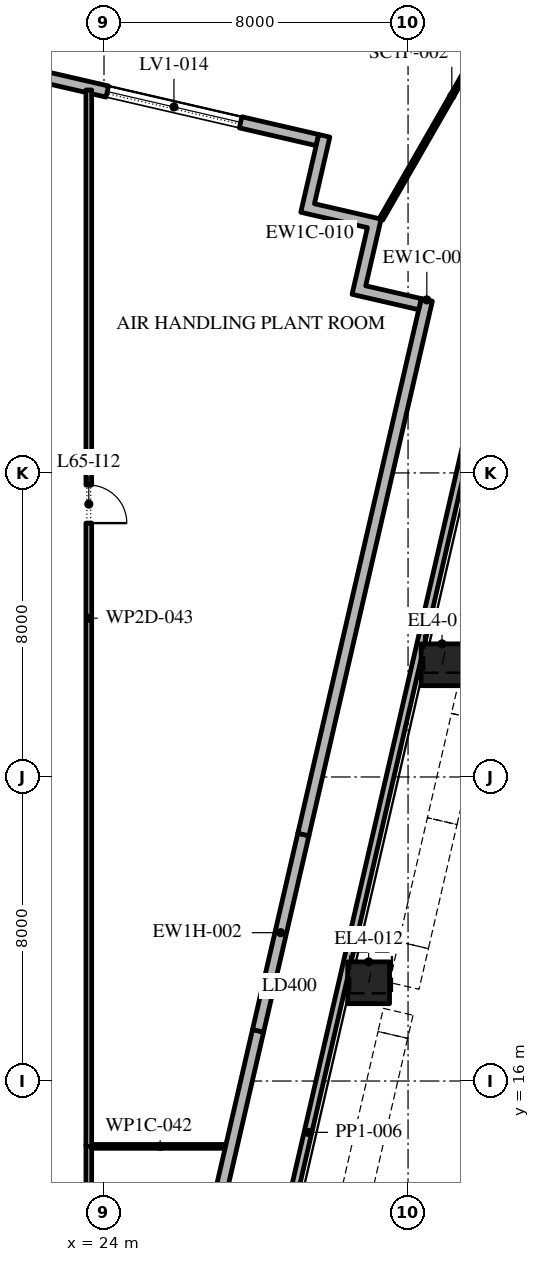
"""IFC4 building model, lengths in metres.
Left out: names, types, materials, properties, quantities, classifications, styles, units other than length and angle.
Written with IfcOpenShell. Run it as: python <this file> out.ifc"""

import sys

from ifc_helpers import new_model, si_unit, direction, frame, frame_2d, origin, origin_2d, place, context, subcontext, project, spatial, polyline, rectangle, outline, extrude, element, fill, save


model = new_model("IFC4")
c1 = context("Model", 3, precision=1e-05, world=origin(), true_north=direction((0.0, 1.0)))
c2 = subcontext(c1, "Body", "Model", "MODEL_VIEW")
j1 = project(units=[si_unit("LENGTHUNIT", "METRE"), si_unit("PLANEANGLEUNIT", "RADIAN")], contexts=[c1])
p1 = place(None, origin())
s1 = spatial("IfcSite", under=j1, at=p1, CompositionType="ELEMENT")
p2 = place(p1, origin())
s2 = spatial("IfcBuilding", under=s1, at=p2, CompositionType="ELEMENT")
p3 = place(p2, frame((0.0, 0.0, 297.6)))
s3 = spatial("IfcBuildingStorey", under=s2, at=p3, CompositionType="ELEMENT", Elevation=297.6)
p4 = place(p3, frame((30.963, 18.585, 0.0), z_axis=(0.01169416231, 0.050524199325, 0.998654370566), x_axis=(-0.974244251432, 0.225495318249, 0.0)))
e1 = element("IfcColumn", 1, at=p4, inside=s3, PredefinedType="COLUMN", context=c2, shape_type="SweptSolid", body=[
    extrude(rectangle(XDim=1.1, YDim=1.1, at=origin_2d()), origin(), (0.0, 0.0, 1.0), 5.407),
])
p5 = place(p3, frame((32.894, 26.952, 0.0), z_axis=(0.014617924938, 0.063118756136, 0.997898962267), x_axis=(-0.97421484969, 0.225622309721, 0.0)))
e2 = element("IfcColumn", 2, at=p5, inside=s3, PredefinedType="COLUMN", context=c2, shape_type="SweptSolid", body=[
    extrude(rectangle(XDim=1.1, YDim=1.1, at=origin_2d()), origin(), (0.0, 0.0, 1.0), 5.411),
])
p6 = place(p3, frame((29.616, 40.758, 0.0), z_axis=(0.0, 0.0, 1.0), x_axis=(-0.974370532314, 0.224949029246, 0.0)))
e3 = element("IfcWall", 3, at=p6, inside=s3, PredefinedType="STANDARD", context=c2, shape_type="SweptSolid", body=[
    extrude(rectangle(XDim=48.0, YDim=0.3, at=frame_2d((24.0, 0.0))), origin(), (0.0, 0.0, 1.0), 4.95),
])
p7 = place(p6, frame((2.075, 0.0, 0.6)))
e4 = element("IfcOpeningElement", 4, at=p7, cuts=e3, PredefinedType="OPENING", context=c2, shape_type="SweptSolid", body=[
    extrude(rectangle(XDim=3.6, YDim=3.9, at=frame_2d((1.8, 1.95))), frame((0.0, 0.16, 0.0), z_axis=(0.0, -1.0, 0.0), x_axis=(1.0, 0.0, 0.0)), (0.0, 0.0, 1.0), 0.32),
])
p8 = place(p6, frame((9.975, 0.0, 0.6)))
e5 = element("IfcOpeningElement", 5, at=p8, cuts=e3, PredefinedType="OPENING", context=c2, shape_type="SweptSolid", body=[
    extrude(rectangle(XDim=3.6, YDim=3.55, at=frame_2d((1.8, 1.775))), frame((0.0, 0.16, 0.0), z_axis=(0.0, -1.0, 0.0), x_axis=(1.0, 0.0, 0.0)), (0.0, 0.0, 1.0), 0.32),
])
p9 = place(p6, frame((18.025, 0.0, 0.6)))
e6 = element("IfcOpeningElement", 6, at=p9, cuts=e3, PredefinedType="OPENING", context=c2, shape_type="SweptSolid", body=[
    extrude(rectangle(XDim=3.6, YDim=3.55, at=frame_2d((1.8, 1.775))), frame((0.0, 0.16, 0.0), z_axis=(0.0, -1.0, 0.0), x_axis=(1.0, 0.0, 0.0)), (0.0, 0.0, 1.0), 0.32),
])
p10 = place(p6, frame((26.075, 0.0, 0.6)))
e7 = element("IfcOpeningElement", 7, at=p10, cuts=e3, PredefinedType="OPENING", context=c2, shape_type="SweptSolid", body=[
    extrude(rectangle(XDim=3.6, YDim=3.9, at=frame_2d((1.8, 1.95))), frame((0.0, 0.16, 0.0), z_axis=(0.0, -1.0, 0.0), x_axis=(1.0, 0.0, 0.0)), (0.0, 0.0, 1.0), 0.32),
])
p11 = place(p6, frame((34.125, 0.0, 0.6)))
e8 = element("IfcOpeningElement", 8, at=p11, cuts=e3, PredefinedType="OPENING", context=c2, shape_type="SweptSolid", body=[
    extrude(rectangle(XDim=3.6, YDim=3.55, at=frame_2d((1.8, 1.775))), frame((0.0, 0.16, 0.0), z_axis=(0.0, -1.0, 0.0), x_axis=(1.0, 0.0, 0.0)), (0.0, 0.0, 1.0), 0.32),
])
p12 = place(p6, frame((42.175, 0.0, 0.6)))
e9 = element("IfcOpeningElement", 9, at=p12, cuts=e3, PredefinedType="OPENING", context=c2, shape_type="SweptSolid", body=[
    extrude(rectangle(XDim=3.6, YDim=3.9, at=frame_2d((1.8, 1.95))), frame((0.0, 0.16, 0.0), z_axis=(0.0, -1.0, 0.0), x_axis=(1.0, 0.0, 0.0)), (0.0, 0.0, 1.0), 0.32),
])
p13 = place(p3, origin())
e10 = element("IfcWall", 10, at=p13, inside=s3, PredefinedType="STANDARD", context=c2, shape_type="SweptSolid", body=[
    extrude(outline(polyline([(30.931, 38.453), (29.177, 38.858), (29.65, 40.905), (29.942, 40.837), (29.537, 39.083), (31.291, 38.678), (30.886, 36.924), (32.348, 36.587), (32.28, 36.295), (30.526, 36.699), (30.931, 38.453)])), origin(), (0.0, 0.0, 1.0), 4.95),
])
p14 = place(p3, frame((22.757, -13.982, -0.05), z_axis=(0.0, 0.0, 1.0), x_axis=(0.224947491476, 0.974370887331, 0.0)))
e11 = element("IfcWall", 11, at=p14, inside=s3, PredefinedType="STANDARD", context=c2, shape_type="SweptSolid", body=[
    extrude(rectangle(XDim=58.769, YDim=0.2, at=frame_2d((29.385, 0.0))), origin(), (0.0, 0.0, 1.0), 1.1),
])
p15 = place(p3, frame((31.291, 38.678, -0.05), z_axis=(0.0, 0.0, 1.0), x_axis=(0.498200820302, 0.867061671769, 0.0)))
e12 = element("IfcWall", 12, at=p15, inside=s3, PredefinedType="STANDARD", context=c2, shape_type="SweptSolid", body=[
    extrude(rectangle(XDim=7.467, YDim=0.1, at=frame_2d((3.734, 0.0))), origin(), (0.0, 0.0, 1.0), 5.0),
])
p16 = place(p3, frame((23.6, 14.33, 0.0), z_axis=(0.0, 0.0, 1.0), x_axis=(0.0, -1.0, 0.0)))
e13 = element("IfcWall", 13, at=p16, inside=s3, PredefinedType="PARTITIONING", context=c2, shape_type="SweptSolid", body=[
    extrude(rectangle(XDim=12.255, YDim=0.15, at=frame_2d((6.127, 0.0))), origin(), (0.0, 0.0, 1.0), 4.95),
])
p17 = place(p16, frame((8.18, 0.0, 0.0)))
e14 = element("IfcOpeningElement", 14, at=p17, cuts=e13, PredefinedType="OPENING", context=c2, shape_type="SweptSolid", body=[
    extrude(rectangle(XDim=1.0, YDim=2.1, at=frame_2d((0.5, 1.05))), frame((0.0, 0.085, 0.0), z_axis=(0.0, -1.0, 0.0), x_axis=(1.0, 0.0, 0.0)), (0.0, 0.0, 1.0), 0.17),
])
p18 = place(p3, frame((23.675, 14.28, 0.0), z_axis=(0.0, 0.0, 1.0), x_axis=(1.0, 0.0, 0.0)))
e15 = element("IfcWall", 15, at=p18, inside=s3, PredefinedType="PARTITIONING", context=c2, shape_type="SweptSolid", body=[
    extrude(rectangle(XDim=3.605, YDim=0.1, at=frame_2d((1.802, 0.0))), origin(), (0.0, 0.0, 1.0), 4.95),
])
p19 = place(p3, frame((23.6, 42.076, 0.0), z_axis=(0.0, 0.0, 1.0), x_axis=(0.0, -1.0, 0.0)))
e16 = element("IfcWall", 16, at=p19, inside=s3, PredefinedType="PARTITIONING", context=c2, shape_type="SweptSolid", body=[
    extrude(rectangle(XDim=27.796, YDim=0.15, at=frame_2d((13.898, 0.0))), origin(), (0.0, 0.0, 1.0), 4.95),
])
p20 = place(p19, frame((10.396, 0.0, 0.0)))
e17 = element("IfcOpeningElement", 17, at=p20, cuts=e16, PredefinedType="OPENING", context=c2, shape_type="SweptSolid", body=[
    extrude(rectangle(XDim=1.0, YDim=2.1, at=frame_2d((0.5, 1.05))), frame((0.0, 0.085, 0.0), z_axis=(0.0, -1.0, 0.0), x_axis=(1.0, 0.0, 0.0)), (0.0, 0.0, 1.0), 0.17),
])
p21 = place(p3, frame((22.789, -5.485, 0.0), z_axis=(0.0, 0.0, 1.0), x_axis=(0.224937970591, 0.974373085315, 0.0)))
e18 = element("IfcWall", 18, at=p21, inside=s3, PredefinedType="STANDARD", context=c2, shape_type="SweptSolid", body=[
    extrude(rectangle(XDim=23.406, YDim=0.3, at=frame_2d((11.703, 0.0))), origin(), (0.0, 0.0, 1.0), 4.95),
])
p22 = place(p21, frame((2.215, 0.0, 0.6)))
e19 = element("IfcOpeningElement", 19, at=p22, cuts=e18, PredefinedType="OPENING", context=c2, shape_type="SweptSolid", body=[
    extrude(rectangle(XDim=3.6, YDim=3.8, at=frame_2d((1.8, 1.9))), frame((0.0, 0.16, 0.0), z_axis=(0.0, -1.0, 0.0), x_axis=(1.0, 0.0, 0.0)), (0.0, 0.0, 1.0), 0.32),
])
p23 = place(p21, frame((9.329, 0.0, 0.6)))
e20 = element("IfcOpeningElement", 20, at=p23, cuts=e18, PredefinedType="OPENING", context=c2, shape_type="SweptSolid", body=[
    extrude(rectangle(XDim=3.6, YDim=3.85, at=frame_2d((1.8, 1.925))), frame((0.0, 0.16, 0.0), z_axis=(0.0, -1.0, 0.0), x_axis=(1.0, 0.0, 0.0)), (0.0, 0.0, 1.0), 0.32),
])
p24 = place(p3, frame((28.054, 17.321, 0.0), z_axis=(0.0, 0.0, 1.0), x_axis=(0.224970521667, 0.974365570195, 0.0)))
e21 = element("IfcWall", 21, at=p24, inside=s3, PredefinedType="STANDARD", context=c2, shape_type="SweptSolid", body=[
    extrude(rectangle(XDim=5.3, YDim=0.3, at=frame_2d((2.65, 0.0))), origin(), (0.0, 0.0, 1.0), 4.05),
])
p25 = place(p3, frame((29.246, 22.486, 0.0), z_axis=(0.0, 0.0, 1.0), x_axis=(0.224953365503, 0.974369531209, 0.0)))
e22 = element("IfcWall", 22, at=p25, inside=s3, PredefinedType="STANDARD", context=c2, shape_type="SweptSolid", body=[
    extrude(rectangle(XDim=14.438, YDim=0.3, at=frame_2d((7.219, 0.0))), origin(), (0.0, 0.0, 1.0), 4.95),
])
p26 = place(p7, origin())
e23 = element("IfcWindow", 23, at=p26, inside=s3, PartitioningType="DOUBLE_PANEL_HORIZONTAL", PredefinedType="WINDOW", context=c2, shape_type="SweptSolid", body=[
    extrude(rectangle(XDim=3.6, YDim=3.9, at=frame_2d((1.8, 1.95))), frame((0.0, 0.03, 0.0), z_axis=(0.0, -1.0, 0.0), x_axis=(1.0, 0.0, 0.0)), (0.0, 0.0, 1.0), 0.06),
])
fill(e4, e23)
p27 = place(p20, origin())
e24 = element("IfcDoor", 24, at=p27, inside=s3, OperationType="SINGLE_SWING_LEFT", PredefinedType="DOOR", context=c2, shape_type="SweptSolid", body=[
    extrude(rectangle(XDim=1.0, YDim=2.1, at=frame_2d((0.5, 1.05))), frame((0.0, 0.025, 0.0), z_axis=(0.0, -1.0, 0.0), x_axis=(1.0, 0.0, 0.0)), (0.0, 0.0, 1.0), 0.05),
])
fill(e17, e24)
save(model, sys.argv[1])
